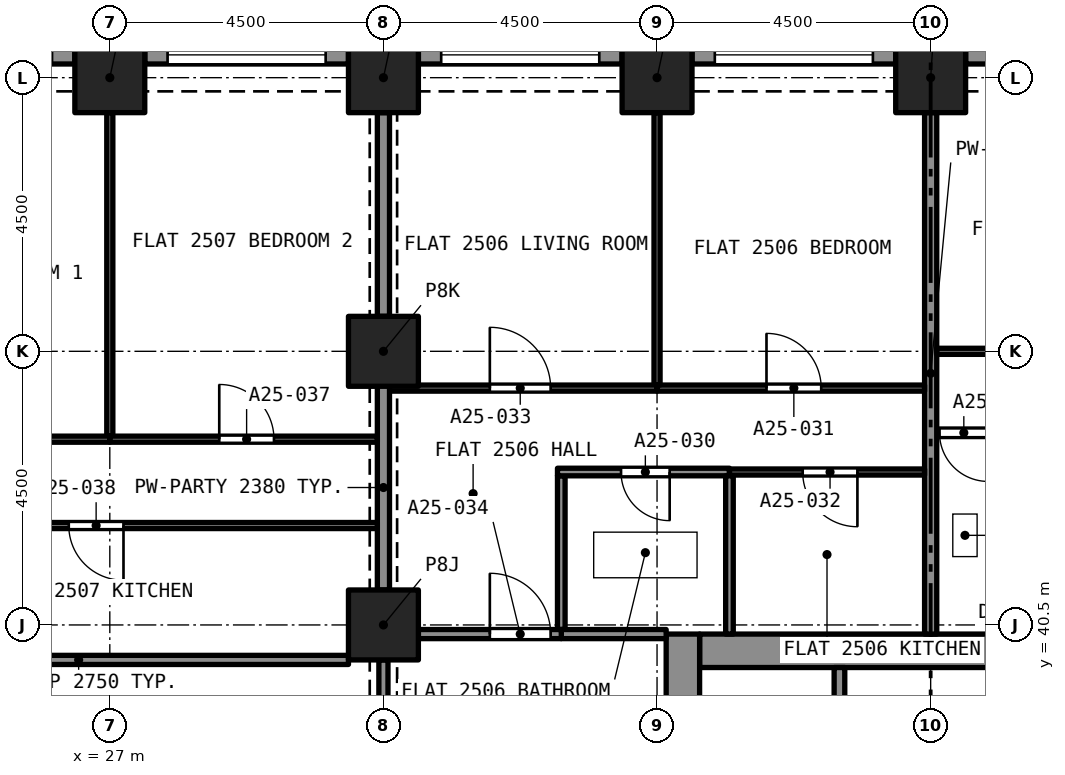
"""IFC4 building model, lengths in metres.
Left out: names, types, materials, properties, quantities, classifications, styles, units other than length and angle.
Written with IfcOpenShell. Run it as: python <this file> out.ifc"""

import sys

from ifc_helpers import new_model, si_unit, direction, frame, frame_2d, origin, origin_2d, place, context, subcontext, project, spatial, rectangle, extrude, element, fill, save


model = new_model("IFC4")
c1 = context("Model", 3, precision=1e-05, world=origin(), true_north=direction((0.0, 1.0)))
c2 = subcontext(c1, "Body", "Model", "MODEL_VIEW")
j1 = project(units=[si_unit("LENGTHUNIT", "METRE"), si_unit("PLANEANGLEUNIT", "RADIAN")], contexts=[c1])
p1 = place(None, origin())
s1 = spatial("IfcSite", under=j1, at=p1, CompositionType="ELEMENT")
p2 = place(p1, origin())
s2 = spatial("IfcBuilding", under=s1, at=p2, CompositionType="ELEMENT")
p3 = place(p2, frame((0.0, 0.0, 92.8)))
s3 = spatial("IfcBuildingStorey", under=s2, at=p3, CompositionType="ELEMENT", Elevation=92.8)
for number, where, z_axis, x_axis in (
    (1, (31.5, 40.5, 0.0), (0.0, 0.0, 1.0), (1.0, 0.0, 0.0)),
    (2, (31.5, 45.0, 0.0), (0.0, 0.0, 1.0), (1.0, 0.0, 0.0)),
    (3, (27.0, 49.5, 0.0), (0.0, 0.0, 1.0), (1.0, 0.0, 0.0)),
    (4, (31.5, 49.5, 0.0), (0.0, 0.0, 1.0), (1.0, 0.0, 0.0)),
    (5, (36.0, 49.5, 0.0), (0.0, 0.0, 1.0), (1.0, 0.0, 0.0)),
    (6, (40.5, 49.5, 0.0), (0.0, 0.0, 1.0), (1.0, 0.0, 0.0)),
):
    element("IfcColumn", number, at=place(p3, frame(where, z_axis=z_axis, x_axis=x_axis)), inside=s3, PredefinedType="COLUMN", context=c2, shape_type="SweptSolid", body=[
        extrude(rectangle(XDim=1.15, YDim=1.15, at=origin_2d()), origin(), (0.0, 0.0, 1.0), 3.2),
    ])
p4 = place(p3, frame((36.7, 40.075, 0.0), z_axis=(0.0, 0.0, 1.0), x_axis=(1.0, 0.0, 0.0)))
e7 = element("IfcWall", 7, at=p4, inside=s3, PredefinedType="SOLIDWALL", context=c2, shape_type="SweptSolid", body=[
    extrude(rectangle(XDim=7.6, YDim=0.55, at=frame_2d((3.8, 0.0))), origin(), (0.0, 0.0, 1.0), 3.2),
])
p5 = place(p3, frame((36.425, 27.15, 0.0), z_axis=(0.0, 0.0, 1.0), x_axis=(0.0, 1.0, 0.0)))
e8 = element("IfcWall", 8, at=p5, inside=s3, PredefinedType="SOLIDWALL", context=c2, shape_type="SweptSolid", body=[
    extrude(rectangle(XDim=13.2, YDim=0.55, at=frame_2d((6.6, 0.0))), origin(), (0.0, 0.0, 1.0), 3.2),
])
p6 = place(p5, frame((8.8, 0.0, 0.0)))
e9 = element("IfcOpeningElement", 9, at=p6, cuts=e8, PredefinedType="OPENING", context=c2, shape_type="SweptSolid", body=[
    extrude(rectangle(XDim=1.2, YDim=2.1, at=frame_2d((0.6, 1.05))), frame((0.0, 0.285, 0.0), z_axis=(0.0, -1.0, 0.0), x_axis=(1.0, 0.0, 0.0)), (0.0, 0.0, 1.0), 0.57),
])
p7 = place(p3, frame((41.075, 49.875, 0.0), z_axis=(0.0, 0.0, 1.0), x_axis=(1.0, 0.0, 0.0)))
e10 = element("IfcWall", 10, at=p7, inside=s3, PredefinedType="SOLIDWALL", context=c2, shape_type="SweptSolid", body=[
    extrude(rectangle(XDim=3.35, YDim=0.3, at=frame_2d((1.675, 0.0))), origin(), (0.0, 0.0, 1.0), 3.2),
])
p8 = place(p7, frame((0.375, 0.0, 0.45)))
e11 = element("IfcOpeningElement", 11, at=p8, cuts=e10, PredefinedType="OPENING", context=c2, shape_type="SweptSolid", body=[
    extrude(rectangle(XDim=2.6, YDim=1.95, at=frame_2d((1.3, 0.975))), frame((0.0, 0.16, 0.0), z_axis=(0.0, -1.0, 0.0), x_axis=(1.0, 0.0, 0.0)), (0.0, 0.0, 1.0), 0.32),
])
p9 = place(p3, frame((36.575, 49.875, 0.0), z_axis=(0.0, 0.0, 1.0), x_axis=(1.0, 0.0, 0.0)))
e12 = element("IfcWall", 12, at=p9, inside=s3, PredefinedType="SOLIDWALL", context=c2, shape_type="SweptSolid", body=[
    extrude(rectangle(XDim=3.35, YDim=0.3, at=frame_2d((1.675, 0.0))), origin(), (0.0, 0.0, 1.0), 3.2),
])
p10 = place(p9, frame((0.375, 0.0, 0.45)))
e13 = element("IfcOpeningElement", 13, at=p10, cuts=e12, PredefinedType="OPENING", context=c2, shape_type="SweptSolid", body=[
    extrude(rectangle(XDim=2.6, YDim=1.95, at=frame_2d((1.3, 0.975))), frame((0.0, 0.16, 0.0), z_axis=(0.0, -1.0, 0.0), x_axis=(1.0, 0.0, 0.0)), (0.0, 0.0, 1.0), 0.32),
])
p11 = place(p3, frame((32.075, 49.875, 0.0), z_axis=(0.0, 0.0, 1.0), x_axis=(1.0, 0.0, 0.0)))
e14 = element("IfcWall", 14, at=p11, inside=s3, PredefinedType="SOLIDWALL", context=c2, shape_type="SweptSolid", body=[
    extrude(rectangle(XDim=3.35, YDim=0.3, at=frame_2d((1.675, 0.0))), origin(), (0.0, 0.0, 1.0), 3.2),
])
p12 = place(p11, frame((0.375, 0.0, 0.45)))
e15 = element("IfcOpeningElement", 15, at=p12, cuts=e14, PredefinedType="OPENING", context=c2, shape_type="SweptSolid", body=[
    extrude(rectangle(XDim=2.6, YDim=1.95, at=frame_2d((1.3, 0.975))), frame((0.0, 0.16, 0.0), z_axis=(0.0, -1.0, 0.0), x_axis=(1.0, 0.0, 0.0)), (0.0, 0.0, 1.0), 0.32),
])
p13 = place(p3, frame((27.575, 49.875, 0.0), z_axis=(0.0, 0.0, 1.0), x_axis=(1.0, 0.0, 0.0)))
e16 = element("IfcWall", 16, at=p13, inside=s3, PredefinedType="SOLIDWALL", context=c2, shape_type="SweptSolid", body=[
    extrude(rectangle(XDim=3.35, YDim=0.3, at=frame_2d((1.675, 0.0))), origin(), (0.0, 0.0, 1.0), 3.2),
])
p14 = place(p13, frame((0.375, 0.0, 0.45)))
e17 = element("IfcOpeningElement", 17, at=p14, cuts=e16, PredefinedType="OPENING", context=c2, shape_type="SweptSolid", body=[
    extrude(rectangle(XDim=2.6, YDim=1.95, at=frame_2d((1.3, 0.975))), frame((0.0, 0.16, 0.0), z_axis=(0.0, -1.0, 0.0), x_axis=(1.0, 0.0, 0.0)), (0.0, 0.0, 1.0), 0.32),
])
p15 = place(p3, frame((23.075, 49.875, 0.0), z_axis=(0.0, 0.0, 1.0), x_axis=(1.0, 0.0, 0.0)))
e18 = element("IfcWall", 18, at=p15, inside=s3, PredefinedType="SOLIDWALL", context=c2, shape_type="SweptSolid", body=[
    extrude(rectangle(XDim=3.35, YDim=0.3, at=frame_2d((1.675, 0.0))), origin(), (0.0, 0.0, 1.0), 3.2),
])
p16 = place(p15, frame((0.375, 0.0, 0.45)))
e19 = element("IfcOpeningElement", 19, at=p16, cuts=e18, PredefinedType="OPENING", context=c2, shape_type="SweptSolid", body=[
    extrude(rectangle(XDim=2.6, YDim=1.95, at=frame_2d((1.3, 0.975))), frame((0.0, 0.16, 0.0), z_axis=(0.0, -1.0, 0.0), x_axis=(1.0, 0.0, 0.0)), (0.0, 0.0, 1.0), 0.32),
])
p17 = place(p3, frame((41.591, 43.66, 0.0), z_axis=(0.0, 0.0, 1.0), x_axis=(-1.0, 0.0, 0.0)))
e20 = element("IfcWall", 20, at=p17, inside=s3, PredefinedType="PARTITIONING", context=c2, shape_type="SweptSolid", body=[
    extrude(rectangle(XDim=0.991, YDim=0.125, at=frame_2d((0.495, 0.0))), origin(), (0.0, 0.0, 1.0), 2.9),
])
p18 = place(p17, frame((0.146, 0.0, 0.0)))
e21 = element("IfcOpeningElement", 21, at=p18, cuts=e20, PredefinedType="OPENING", context=c2, shape_type="SweptSolid", body=[
    extrude(rectangle(XDim=0.8, YDim=2.1, at=frame_2d((0.4, 1.05))), frame((0.0, 0.073, 0.0), z_axis=(0.0, -1.0, 0.0), x_axis=(1.0, 0.0, 0.0)), (0.0, 0.0, 1.0), 0.145),
])
p19 = place(p3, frame((40.5, 40.35, 0.0), z_axis=(0.0, 0.0, 1.0), x_axis=(0.0, 1.0, 0.0)))
e22 = element("IfcWall", 22, at=p19, inside=s3, PredefinedType="PARTITIONING", context=c2, shape_type="SweptSolid", body=[
    extrude(rectangle(XDim=8.575, YDim=0.2, at=frame_2d((4.288, 0.0))), origin(), (0.0, 0.0, 1.0), 2.9),
])
p20 = place(p3, frame((40.6, 45.0, 0.0), z_axis=(0.0, 0.0, 1.0), x_axis=(1.0, 0.0, 0.0)))
e23 = element("IfcWall", 23, at=p20, inside=s3, PredefinedType="PARTITIONING", context=c2, shape_type="SweptSolid", body=[
    extrude(rectangle(XDim=4.4, YDim=0.1, at=frame_2d((2.2, 0.0))), origin(), (0.0, 0.0, 1.0), 2.9),
])
p21 = place(p20, frame((1.7, 0.0, 0.0)))
e24 = element("IfcOpeningElement", 24, at=p21, cuts=e23, PredefinedType="OPENING", context=c2, shape_type="SweptSolid", body=[
    extrude(rectangle(XDim=0.9, YDim=2.1, at=frame_2d((0.45, 1.05))), frame((0.0, 0.06, 0.0), z_axis=(0.0, -1.0, 0.0), x_axis=(1.0, 0.0, 0.0)), (0.0, 0.0, 1.0), 0.12),
])
p22 = place(p3, frame((34.425, 40.425, 0.0), z_axis=(0.0, 0.0, 1.0), x_axis=(0.0, 1.0, 0.0)))
e25 = element("IfcWall", 25, at=p22, inside=s3, PredefinedType="PARTITIONING", context=c2, shape_type="SweptSolid", body=[
    extrude(rectangle(XDim=2.527, YDim=0.125, at=frame_2d((1.264, 0.0))), origin(), (0.0, 0.0, 1.0), 2.9),
])
p23 = place(p3, frame((37.19, 43.015, 0.0), z_axis=(0.0, 0.0, 1.0), x_axis=(-1.0, 0.0, 0.0)))
e26 = element("IfcWall", 26, at=p23, inside=s3, PredefinedType="PARTITIONING", context=c2, shape_type="SweptSolid", body=[
    extrude(rectangle(XDim=2.828, YDim=0.125, at=frame_2d((1.414, 0.0))), origin(), (0.0, 0.0, 1.0), 2.9),
])
p24 = place(p23, frame((0.983, 0.0, 0.0)))
e27 = element("IfcOpeningElement", 27, at=p24, cuts=e26, PredefinedType="OPENING", context=c2, shape_type="SweptSolid", body=[
    extrude(rectangle(XDim=0.8, YDim=2.1, at=frame_2d((0.4, 1.05))), frame((0.0, 0.073, 0.0), z_axis=(0.0, -1.0, 0.0), x_axis=(1.0, 0.0, 0.0)), (0.0, 0.0, 1.0), 0.145),
])
p25 = place(p3, frame((37.191, 40.35, 0.0), z_axis=(0.0, 0.0, 1.0), x_axis=(0.0, 1.0, 0.0)))
e28 = element("IfcWall", 28, at=p25, inside=s3, PredefinedType="PARTITIONING", context=c2, shape_type="SweptSolid", body=[
    extrude(rectangle(XDim=2.602, YDim=0.125, at=frame_2d((1.301, 0.0))), origin(), (0.0, 0.0, 1.0), 2.9),
])
p26 = place(p3, frame((34.425, 40.35, 0.0), z_axis=(0.0, 0.0, 1.0), x_axis=(1.0, 0.0, 0.0)))
e29 = element("IfcWall", 29, at=p26, inside=s3, PredefinedType="PARTITIONING", context=c2, shape_type="SweptSolid", body=[
    extrude(rectangle(XDim=1.725, YDim=0.15, at=frame_2d((0.862, 0.0))), origin(), (0.0, 0.0, 1.0), 2.9),
])
p27 = place(p3, frame((36.0, 44.395, 0.0), z_axis=(0.0, 0.0, 1.0), x_axis=(1.0, 0.0, 0.0)))
e30 = element("IfcWall", 30, at=p27, inside=s3, PredefinedType="PARTITIONING", context=c2, shape_type="SweptSolid", body=[
    extrude(rectangle(XDim=4.4, YDim=0.1, at=frame_2d((2.2, 0.0))), origin(), (0.0, 0.0, 1.0), 2.9),
])
p28 = place(p27, frame((1.8, 0.0, 0.0)))
e31 = element("IfcOpeningElement", 31, at=p28, cuts=e30, PredefinedType="OPENING", context=c2, shape_type="SweptSolid", body=[
    extrude(rectangle(XDim=0.9, YDim=2.1, at=frame_2d((0.45, 1.05))), frame((0.0, 0.06, 0.0), z_axis=(0.0, -1.0, 0.0), x_axis=(1.0, 0.0, 0.0)), (0.0, 0.0, 1.0), 0.12),
])
p29 = place(p3, frame((36.0, 44.445, 0.0), z_axis=(0.0, 0.0, 1.0), x_axis=(0.0, 1.0, 0.0)))
e32 = element("IfcWall", 32, at=p29, inside=s3, PredefinedType="PARTITIONING", context=c2, shape_type="SweptSolid", body=[
    extrude(rectangle(XDim=4.48, YDim=0.1, at=frame_2d((2.24, 0.0))), origin(), (0.0, 0.0, 1.0), 2.9),
])
p30 = place(p3, frame((40.4, 43.015, 0.0), z_axis=(0.0, 0.0, 1.0), x_axis=(-1.0, 0.0, 0.0)))
e33 = element("IfcWall", 33, at=p30, inside=s3, PredefinedType="PARTITIONING", context=c2, shape_type="SweptSolid", body=[
    extrude(rectangle(XDim=3.209, YDim=0.1, at=frame_2d((1.605, 0.0))), origin(), (0.0, 0.0, 1.0), 2.9),
])
p31 = place(p30, frame((1.105, 0.0, 0.0)))
e34 = element("IfcOpeningElement", 34, at=p31, cuts=e33, PredefinedType="OPENING", context=c2, shape_type="SweptSolid", body=[
    extrude(rectangle(XDim=0.9, YDim=2.1, at=frame_2d((0.45, 1.05))), frame((0.0, 0.06, 0.0), z_axis=(0.0, -1.0, 0.0), x_axis=(1.0, 0.0, 0.0)), (0.0, 0.0, 1.0), 0.12),
])
p32 = place(p3, frame((31.6, 44.395, 0.0), z_axis=(0.0, 0.0, 1.0), x_axis=(1.0, 0.0, 0.0)))
e35 = element("IfcWall", 35, at=p32, inside=s3, PredefinedType="PARTITIONING", context=c2, shape_type="SweptSolid", body=[
    extrude(rectangle(XDim=4.4, YDim=0.1, at=frame_2d((2.2, 0.0))), origin(), (0.0, 0.0, 1.0), 2.9),
])
p33 = place(p32, frame((1.65, 0.0, 0.0)))
e36 = element("IfcOpeningElement", 36, at=p33, cuts=e35, PredefinedType="OPENING", context=c2, shape_type="SweptSolid", body=[
    extrude(rectangle(XDim=1.0, YDim=2.1, at=frame_2d((0.5, 1.05))), frame((0.0, 0.06, 0.0), z_axis=(0.0, -1.0, 0.0), x_axis=(1.0, 0.0, 0.0)), (0.0, 0.0, 1.0), 0.12),
])
p34 = place(p3, frame((31.5, 41.075, 0.0), z_axis=(0.0, 0.0, 1.0), x_axis=(0.0, 1.0, 0.0)))
e37 = element("IfcWall", 37, at=p34, inside=s3, PredefinedType="PARTITIONING", context=c2, shape_type="SweptSolid", body=[
    extrude(rectangle(XDim=3.37, YDim=0.2, at=frame_2d((1.685, 0.0))), origin(), (0.0, 0.0, 1.0), 2.38),
])
p35 = place(p3, frame((32.075, 40.35, 0.0), z_axis=(0.0, 0.0, 1.0), x_axis=(1.0, 0.0, 0.0)))
e38 = element("IfcWall", 38, at=p35, inside=s3, PredefinedType="PARTITIONING", context=c2, shape_type="SweptSolid", body=[
    extrude(rectangle(XDim=2.35, YDim=0.15, at=frame_2d((1.175, 0.0))), origin(), (0.0, 0.0, 1.0), 2.9),
])
p36 = place(p35, frame((1.175, 0.0, 0.0)))
e39 = element("IfcOpeningElement", 39, at=p36, cuts=e38, PredefinedType="OPENING", context=c2, shape_type="SweptSolid", body=[
    extrude(rectangle(XDim=1.0, YDim=2.1, at=frame_2d((0.5, 1.05))), frame((0.0, 0.085, 0.0), z_axis=(0.0, -1.0, 0.0), x_axis=(1.0, 0.0, 0.0)), (0.0, 0.0, 1.0), 0.17),
])
p37 = place(p3, frame((31.5, 45.575, 0.0), z_axis=(0.0, 0.0, 1.0), x_axis=(0.0, 1.0, 0.0)))
e40 = element("IfcWall", 40, at=p37, inside=s3, PredefinedType="PARTITIONING", context=c2, shape_type="SweptSolid", body=[
    extrude(rectangle(XDim=3.35, YDim=0.2, at=frame_2d((1.675, 0.0))), origin(), (0.0, 0.0, 1.0), 2.38),
])
p38 = place(p3, frame((27.0, 43.605, 0.0), z_axis=(0.0, 0.0, 1.0), x_axis=(0.0, 1.0, 0.0)))
e41 = element("IfcWall", 41, at=p38, inside=s3, PredefinedType="PARTITIONING", context=c2, shape_type="SweptSolid", body=[
    extrude(rectangle(XDim=5.32, YDim=0.1, at=frame_2d((2.66, 0.0))), origin(), (0.0, 0.0, 1.0), 2.75),
])
p39 = place(p3, frame((22.5, 43.555, 0.0), z_axis=(0.0, 0.0, 1.0), x_axis=(1.0, 0.0, 0.0)))
e42 = element("IfcWall", 42, at=p39, inside=s3, PredefinedType="PARTITIONING", context=c2, shape_type="SweptSolid", body=[
    extrude(rectangle(XDim=4.5, YDim=0.1, at=frame_2d((2.25, 0.0))), origin(), (0.0, 0.0, 1.0), 2.75),
])
p40 = place(p39, frame((1.8, 0.0, 0.0)))
e43 = element("IfcOpeningElement", 43, at=p40, cuts=e42, PredefinedType="OPENING", context=c2, shape_type="SweptSolid", body=[
    extrude(rectangle(XDim=0.9, YDim=2.1, at=frame_2d((0.45, 1.05))), frame((0.0, 0.06, 0.0), z_axis=(0.0, -1.0, 0.0), x_axis=(1.0, 0.0, 0.0)), (0.0, 0.0, 1.0), 0.12),
])
p41 = place(p3, frame((27.0, 43.555, 0.0), z_axis=(0.0, 0.0, 1.0), x_axis=(1.0, 0.0, 0.0)))
e44 = element("IfcWall", 44, at=p41, inside=s3, PredefinedType="PARTITIONING", context=c2, shape_type="SweptSolid", body=[
    extrude(rectangle(XDim=4.4, YDim=0.1, at=frame_2d((2.2, 0.0))), origin(), (0.0, 0.0, 1.0), 2.75),
])
p42 = place(p41, frame((1.8, 0.0, 0.0)))
e45 = element("IfcOpeningElement", 45, at=p42, cuts=e44, PredefinedType="OPENING", context=c2, shape_type="SweptSolid", body=[
    extrude(rectangle(XDim=0.9, YDim=2.1, at=frame_2d((0.45, 1.05))), frame((0.0, 0.06, 0.0), z_axis=(0.0, -1.0, 0.0), x_axis=(1.0, 0.0, 0.0)), (0.0, 0.0, 1.0), 0.12),
])
p43 = place(p3, frame((31.4, 42.135, 0.0), z_axis=(0.0, 0.0, 1.0), x_axis=(-1.0, 0.0, 0.0)))
e46 = element("IfcWall", 46, at=p43, inside=s3, PredefinedType="PARTITIONING", context=c2, shape_type="SweptSolid", body=[
    extrude(rectangle(XDim=9.4, YDim=0.1, at=frame_2d((4.7, 0.0))), origin(), (0.0, 0.0, 1.0), 2.75),
])
p44 = place(p43, frame((4.175, 0.0, 0.0)))
e47 = element("IfcOpeningElement", 47, at=p44, cuts=e46, PredefinedType="OPENING", context=c2, shape_type="SweptSolid", body=[
    extrude(rectangle(XDim=0.9, YDim=2.1, at=frame_2d((0.45, 1.05))), frame((0.0, 0.06, 0.0), z_axis=(0.0, -1.0, 0.0), x_axis=(1.0, 0.0, 0.0)), (0.0, 0.0, 1.0), 0.12),
])
p45 = place(p3, frame((22.05, 39.925, 0.0), z_axis=(0.0, 0.0, 1.0), x_axis=(1.0, 0.0, 0.0)))
e48 = element("IfcWall", 48, at=p45, inside=s3, PredefinedType="PARTITIONING", context=c2, shape_type="SweptSolid", body=[
    extrude(rectangle(XDim=8.875, YDim=0.15, at=frame_2d((4.438, 0.0))), origin(), (0.0, 0.0, 1.0), 2.75),
])
p46 = place(p3, frame((31.5, 36.575, 0.0), z_axis=(0.0, 0.0, 1.0), x_axis=(0.0, 1.0, 0.0)))
e49 = element("IfcWall", 49, at=p46, inside=s3, PredefinedType="PARTITIONING", context=c2, shape_type="SweptSolid", body=[
    extrude(rectangle(XDim=3.35, YDim=0.15, at=frame_2d((1.675, 0.0))), origin(), (0.0, 0.0, 1.0), 2.38),
])
p47 = place(p46, frame((1.075, 0.0, 0.0)))
e50 = element("IfcOpeningElement", 50, at=p47, cuts=e49, PredefinedType="OPENING", context=c2, shape_type="SweptSolid", body=[
    extrude(rectangle(XDim=1.2, YDim=2.1, at=frame_2d((0.6, 1.05))), frame((0.0, 0.085, 0.0), z_axis=(0.0, -1.0, 0.0), x_axis=(1.0, 0.0, 0.0)), (0.0, 0.0, 1.0), 0.17),
])
p48 = place(p3, frame((39.0, 37.5, 0.0), z_axis=(0.0, 0.0, 1.0), x_axis=(0.0, 1.0, 0.0)))
e51 = element("IfcWall", 51, at=p48, inside=s3, PredefinedType="SOLIDWALL", context=c2, shape_type="SweptSolid", body=[
    extrude(rectangle(XDim=2.3, YDim=0.175, at=frame_2d((1.15, 0.0))), origin(), (0.0, 0.0, 1.0), 2.9),
])
p49 = place(p10, origin())
e52 = element("IfcWindow", 52, at=p49, inside=s3, PartitioningType="SINGLE_PANEL", PredefinedType="WINDOW", context=c2, shape_type="SweptSolid", body=[
    extrude(rectangle(XDim=2.6, YDim=1.95, at=frame_2d((1.3, 0.975))), frame((0.0, 0.03, 0.0), z_axis=(0.0, -1.0, 0.0), x_axis=(1.0, 0.0, 0.0)), (0.0, 0.0, 1.0), 0.06),
])
fill(e13, e52)
p50 = place(p12, origin())
e53 = element("IfcWindow", 53, at=p50, inside=s3, PartitioningType="SINGLE_PANEL", PredefinedType="WINDOW", context=c2, shape_type="SweptSolid", body=[
    extrude(rectangle(XDim=2.6, YDim=1.95, at=frame_2d((1.3, 0.975))), frame((0.0, 0.03, 0.0), z_axis=(0.0, -1.0, 0.0), x_axis=(1.0, 0.0, 0.0)), (0.0, 0.0, 1.0), 0.06),
])
fill(e15, e53)
p51 = place(p14, origin())
e54 = element("IfcWindow", 54, at=p51, inside=s3, PartitioningType="SINGLE_PANEL", PredefinedType="WINDOW", context=c2, shape_type="SweptSolid", body=[
    extrude(rectangle(XDim=2.6, YDim=1.95, at=frame_2d((1.3, 0.975))), frame((0.0, 0.03, 0.0), z_axis=(0.0, -1.0, 0.0), x_axis=(1.0, 0.0, 0.0)), (0.0, 0.0, 1.0), 0.06),
])
fill(e17, e54)
p52 = place(p18, origin())
e55 = element("IfcDoor", 55, at=p52, inside=s3, OperationType="SINGLE_SWING_RIGHT", PredefinedType="DOOR", context=c2, shape_type="SweptSolid", body=[
    extrude(rectangle(XDim=0.8, YDim=2.1, at=frame_2d((0.4, 1.05))), frame((0.0, 0.025, 0.0), z_axis=(0.0, -1.0, 0.0), x_axis=(1.0, 0.0, 0.0)), (0.0, 0.0, 1.0), 0.05),
])
fill(e21, e55)
p53 = place(p24, origin())
e56 = element("IfcDoor", 56, at=p53, inside=s3, OperationType="SINGLE_SWING_LEFT", PredefinedType="DOOR", context=c2, shape_type="SweptSolid", body=[
    extrude(rectangle(XDim=0.8, YDim=2.1, at=frame_2d((0.4, 1.05))), frame((0.0, 0.025, 0.0), z_axis=(0.0, -1.0, 0.0), x_axis=(1.0, 0.0, 0.0)), (0.0, 0.0, 1.0), 0.05),
])
fill(e27, e56)
p54 = place(p28, origin())
e57 = element("IfcDoor", 57, at=p54, inside=s3, OperationType="SINGLE_SWING_RIGHT", PredefinedType="DOOR", context=c2, shape_type="SweptSolid", body=[
    extrude(rectangle(XDim=0.9, YDim=2.1, at=frame_2d((0.45, 1.05))), frame((0.0, 0.025, 0.0), z_axis=(0.0, -1.0, 0.0), x_axis=(1.0, 0.0, 0.0)), (0.0, 0.0, 1.0), 0.05),
])
fill(e31, e57)
p55 = place(p31, origin())
e58 = element("IfcDoor", 58, at=p55, inside=s3, OperationType="SINGLE_SWING_LEFT", PredefinedType="DOOR", context=c2, shape_type="SweptSolid", body=[
    extrude(rectangle(XDim=0.9, YDim=2.1, at=frame_2d((0.45, 1.05))), frame((0.0, 0.025, 0.0), z_axis=(0.0, -1.0, 0.0), x_axis=(1.0, 0.0, 0.0)), (0.0, 0.0, 1.0), 0.05),
])
fill(e34, e58)
p56 = place(p33, origin())
e59 = element("IfcDoor", 59, at=p56, inside=s3, OperationType="SINGLE_SWING_LEFT", PredefinedType="DOOR", context=c2, shape_type="SweptSolid", body=[
    extrude(rectangle(XDim=1.0, YDim=2.1, at=frame_2d((0.5, 1.05))), frame((0.0, 0.025, 0.0), z_axis=(0.0, -1.0, 0.0), x_axis=(1.0, 0.0, 0.0)), (0.0, 0.0, 1.0), 0.05),
])
fill(e36, e59)
p57 = place(p36, origin())
e60 = element("IfcDoor", 60, at=p57, inside=s3, OperationType="SINGLE_SWING_RIGHT", PredefinedType="DOOR", context=c2, shape_type="SweptSolid", body=[
    extrude(rectangle(XDim=1.0, YDim=2.1, at=frame_2d((0.5, 1.05))), frame((0.0, 0.025, 0.0), z_axis=(0.0, -1.0, 0.0), x_axis=(1.0, 0.0, 0.0)), (0.0, 0.0, 1.0), 0.05),
])
fill(e39, e60)
p58 = place(p42, origin())
e61 = element("IfcDoor", 61, at=p58, inside=s3, OperationType="SINGLE_SWING_RIGHT", PredefinedType="DOOR", context=c2, shape_type="SweptSolid", body=[
    extrude(rectangle(XDim=0.9, YDim=2.1, at=frame_2d((0.45, 1.05))), frame((0.0, 0.025, 0.0), z_axis=(0.0, -1.0, 0.0), x_axis=(1.0, 0.0, 0.0)), (0.0, 0.0, 1.0), 0.05),
])
fill(e45, e61)
p59 = place(p44, origin())
e62 = element("IfcDoor", 62, at=p59, inside=s3, OperationType="SINGLE_SWING_LEFT", PredefinedType="DOOR", context=c2, shape_type="SweptSolid", body=[
    extrude(rectangle(XDim=0.9, YDim=2.1, at=frame_2d((0.45, 1.05))), frame((0.0, 0.025, 0.0), z_axis=(0.0, -1.0, 0.0), x_axis=(1.0, 0.0, 0.0)), (0.0, 0.0, 1.0), 0.05),
])
fill(e47, e62)
save(model, sys.argv[1])
